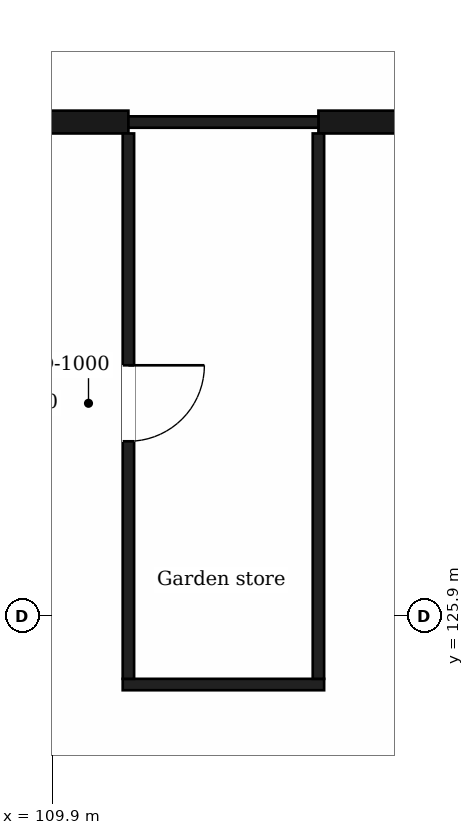
"""IFC4 building model, lengths in metres.
Left out: names, types, materials, properties, quantities, classifications, styles, units other than length and angle.
Written with IfcOpenShell. Run it as: python <this file> out.ifc"""

import sys

from ifc_helpers import new_model, si_unit, direction, frame, frame_2d, origin, place, context, subcontext, project, spatial, rectangle, extrude, element, fill, save


model = new_model("IFC4")
c1 = context("Model", 3, precision=1e-05, world=origin(), true_north=direction((0.0, 1.0)))
c2 = subcontext(c1, "Body", "Model", "MODEL_VIEW")
j1 = project(units=[si_unit("LENGTHUNIT", "METRE"), si_unit("PLANEANGLEUNIT", "RADIAN")], contexts=[c1])
p1 = place(None, origin())
s1 = spatial("IfcSite", under=j1, at=p1, CompositionType="ELEMENT")
p2 = place(p1, origin())
s2 = spatial("IfcBuilding", under=s1, at=p2, CompositionType="ELEMENT")
p3 = place(p2, frame((0.0, 0.0, 135.4)))
s3 = spatial("IfcBuildingStorey", under=s2, at=p3, CompositionType="ELEMENT", Elevation=135.4)
p4 = place(p3, frame((110.825, 125.0, 0.0), z_axis=(0.0, 0.0, 1.0), x_axis=(1.0, 0.0, 0.0)))
e1 = element("IfcWall", 1, at=p4, inside=s3, PredefinedType="PARTITIONING", context=c2, shape_type="SweptSolid", body=[
    extrude(rectangle(XDim=2.65, YDim=0.15, at=frame_2d((1.325, 0.0))), origin(), (0.0, 0.0, 1.0), 6.9),
])
p5 = place(p3, frame((107.5, 132.4, 0.0), z_axis=(0.0, 0.0, 1.0), x_axis=(1.0, 0.0, 0.0)))
e2 = element("IfcWall", 2, at=p5, inside=s3, PredefinedType="PARTITIONING", context=c2, shape_type="SweptSolid", body=[
    extrude(rectangle(XDim=3.4, YDim=0.3, at=frame_2d((1.7, 0.0))), origin(), (0.0, 0.0, 1.0), 1.0),
])
p6 = place(p3, frame((113.4, 132.4, 0.0), z_axis=(0.0, 0.0, 1.0), x_axis=(1.0, 0.0, 0.0)))
e3 = element("IfcWall", 3, at=p6, inside=s3, PredefinedType="PARTITIONING", context=c2, shape_type="SweptSolid", body=[
    extrude(rectangle(XDim=5.6, YDim=0.3, at=frame_2d((2.8, 0.0))), origin(), (0.0, 0.0, 1.0), 1.0),
])
p7 = place(p3, frame((110.9, 132.4, 0.0), z_axis=(0.0, 0.0, 1.0), x_axis=(1.0, 0.0, 0.0)))
e4 = element("IfcWall", 4, at=p7, inside=s3, PredefinedType="PARTITIONING", context=c2, shape_type="SweptSolid", body=[
    extrude(rectangle(XDim=2.5, YDim=0.15, at=frame_2d((1.25, 0.0))), origin(), (0.0, 0.0, 1.0), 6.9),
])
p8 = place(p3, frame((110.9, 125.075, 0.0), z_axis=(0.0, 0.0, 1.0), x_axis=(0.0, 1.0, 0.0)))
e5 = element("IfcWall", 5, at=p8, inside=s3, PredefinedType="PARTITIONING", context=c2, shape_type="SweptSolid", body=[
    extrude(rectangle(XDim=7.175, YDim=0.15, at=frame_2d((3.587, 0.0))), origin(), (0.0, 0.0, 1.0), 6.9),
])
p9 = place(p8, frame((3.125, 0.0, 0.0)))
e6 = element("IfcOpeningElement", 6, at=p9, cuts=e5, PredefinedType="OPENING", context=c2, shape_type="SweptSolid", body=[
    extrude(rectangle(XDim=1.0, YDim=2.1, at=frame_2d((0.5, 1.05))), frame((0.0, 0.085, 0.0), z_axis=(0.0, -1.0, 0.0), x_axis=(1.0, 0.0, 0.0)), (0.0, 0.0, 1.0), 0.17),
])
p10 = place(p3, frame((113.4, 125.075, 0.0), z_axis=(0.0, 0.0, 1.0), x_axis=(0.0, 1.0, 0.0)))
e7 = element("IfcWall", 7, at=p10, inside=s3, PredefinedType="PARTITIONING", context=c2, shape_type="SweptSolid", body=[
    extrude(rectangle(XDim=7.175, YDim=0.15, at=frame_2d((3.587, 0.0))), origin(), (0.0, 0.0, 1.0), 6.9),
])
p11 = place(p9, origin())
e8 = element("IfcDoor", 8, at=p11, inside=s3, OperationType="SINGLE_SWING_RIGHT", PredefinedType="DOOR", context=c2, shape_type="SweptSolid", body=[
    extrude(rectangle(XDim=1.0, YDim=2.1, at=frame_2d((0.5, 1.05))), frame((0.0, 0.025, 0.0), z_axis=(0.0, -1.0, 0.0), x_axis=(1.0, 0.0, 0.0)), (0.0, 0.0, 1.0), 0.05),
])
fill(e6, e8)
save(model, sys.argv[1])
